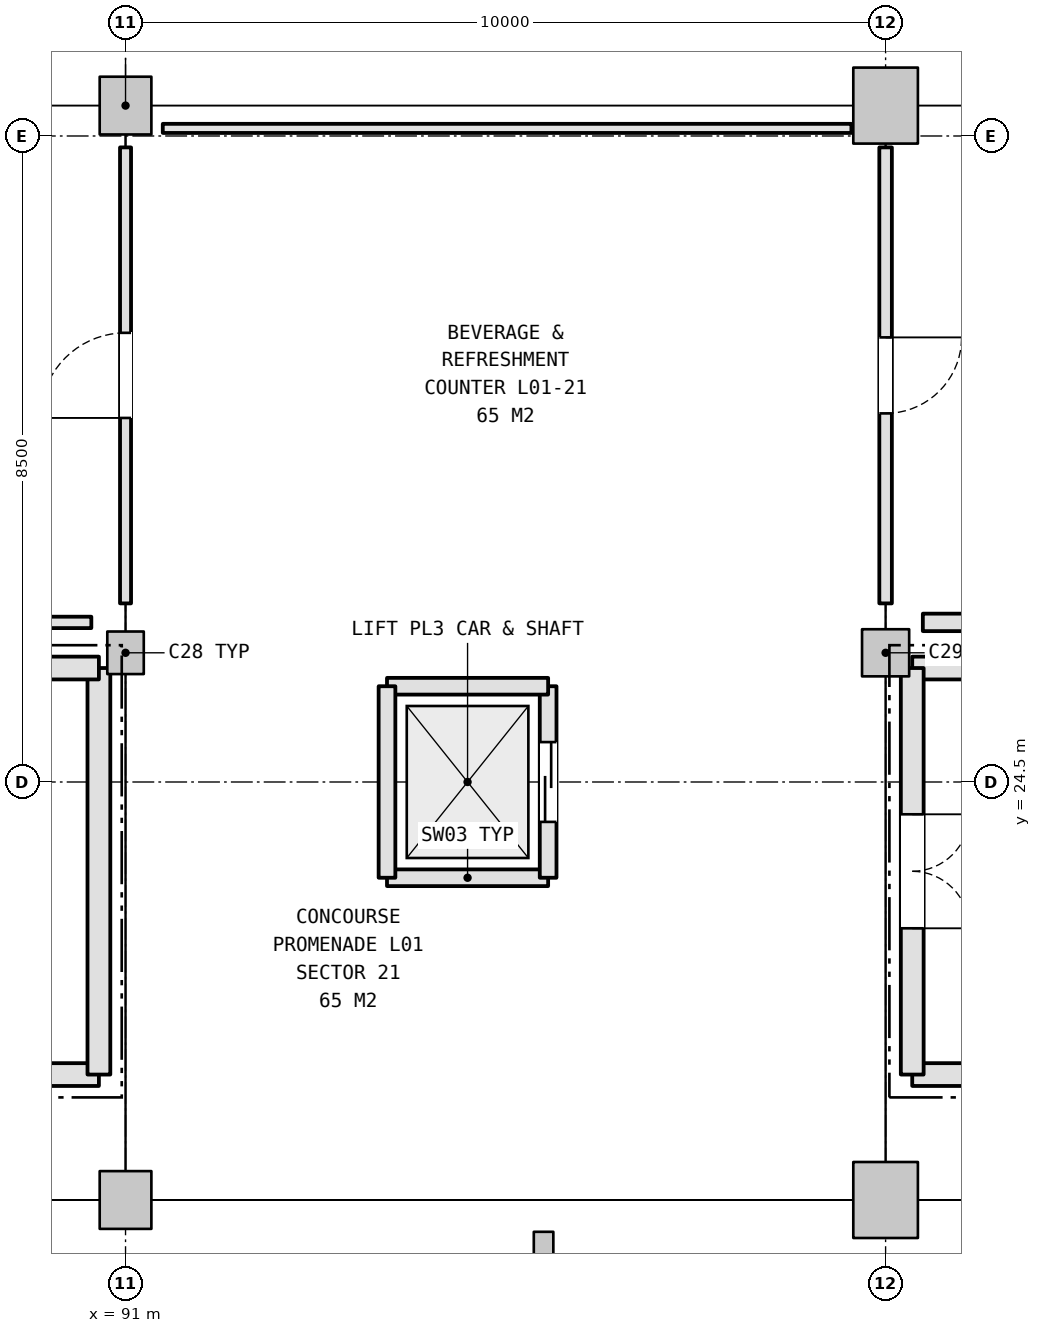
"""IFC4 building model, lengths in metres.
Left out: names, types, materials, properties, quantities, classifications, styles, units other than length and angle.
Written with IfcOpenShell. Run it as: python <this file> out.ifc"""

import sys

from ifc_helpers import new_model, si_unit, direction, frame, frame_2d, origin, origin_2d, place, context, subcontext, project, spatial, rectangle, i_section, extrude, element, fill, save


model = new_model("IFC4")
c1 = context("Model", 3, precision=1e-05, world=origin(), true_north=direction((0.0, 1.0)))
c2 = subcontext(c1, "Body", "Model", "MODEL_VIEW")
j1 = project(units=[si_unit("LENGTHUNIT", "METRE"), si_unit("PLANEANGLEUNIT", "RADIAN")], contexts=[c1])
p1 = place(None, origin())
s1 = spatial("IfcSite", under=j1, at=p1, CompositionType="ELEMENT")
p2 = place(p1, origin())
s2 = spatial("IfcBuilding", under=s1, at=p2, CompositionType="ELEMENT")
p3 = place(p2, frame((0.0, 0.0, 5.4)))
s3 = spatial("IfcBuildingStorey", under=s2, at=p3, CompositionType="ELEMENT", Elevation=5.4)
p4 = place(p3, frame((91.0, 33.4, 0.0), z_axis=(0.0, 0.0, 1.0), x_axis=(1.0, 0.0, 0.0)))
e1 = element("IfcColumn", 1, at=p4, inside=s3, PredefinedType="COLUMN", context=c2, shape_type="SweptSolid", body=[
    extrude(rectangle(XDim=0.68, YDim=0.76, at=origin_2d()), origin(), (0.0, 0.0, 1.0), 5.4),
])
p5 = place(p3, frame((91.0, 26.2, 0.0), z_axis=(0.0, 0.0, 1.0), x_axis=(1.0, 0.0, 0.0)))
e2 = element("IfcColumn", 2, at=p5, inside=s3, PredefinedType="COLUMN", context=c2, shape_type="SweptSolid", body=[
    extrude(rectangle(XDim=0.48, YDim=0.56, at=origin_2d()), origin(), (0.0, 0.0, 1.0), 5.4),
])
p6 = place(p3, frame((91.0, 19.0, 0.0), z_axis=(0.0, 0.0, 1.0), x_axis=(1.0, 0.0, 0.0)))
e3 = element("IfcColumn", 3, at=p6, inside=s3, PredefinedType="COLUMN", context=c2, shape_type="SweptSolid", body=[
    extrude(rectangle(XDim=0.68, YDim=0.76, at=origin_2d()), origin(), (0.0, 0.0, 1.0), 5.4),
])
p7 = place(p3, frame((101.0, 33.4, 0.0), z_axis=(0.0, 0.0, 1.0), x_axis=(1.0, 0.0, 0.0)))
e4 = element("IfcColumn", 4, at=p7, inside=s3, PredefinedType="COLUMN", context=c2, shape_type="SweptSolid", body=[
    extrude(rectangle(XDim=0.85, YDim=1.0, at=origin_2d()), origin(), (0.0, 0.0, 1.0), 5.4),
])
p8 = place(p3, frame((101.0, 26.2, 0.0), z_axis=(0.0, 0.0, 1.0), x_axis=(1.0, 0.0, 0.0)))
e5 = element("IfcColumn", 5, at=p8, inside=s3, PredefinedType="COLUMN", context=c2, shape_type="SweptSolid", body=[
    extrude(rectangle(XDim=0.62, YDim=0.62, at=origin_2d()), origin(), (0.0, 0.0, 1.0), 5.4),
])
p9 = place(p3, frame((101.0, 19.0, 0.0), z_axis=(0.0, 0.0, 1.0), x_axis=(1.0, 0.0, 0.0)))
e6 = element("IfcColumn", 6, at=p9, inside=s3, PredefinedType="COLUMN", context=c2, shape_type="SweptSolid", body=[
    extrude(rectangle(XDim=0.85, YDim=1.0, at=origin_2d()), origin(), (0.0, 0.0, 1.0), 5.4),
])
p10 = place(p3, frame((96.5, 18.4, 0.0), z_axis=(0.0, 0.0, 1.0), x_axis=(1.0, 0.0, 0.0)))
e7 = element("IfcColumn", 7, at=p10, inside=s3, PredefinedType="COLUMN", context=c2, shape_type="SweptSolid", body=[
    extrude(i_section(OverallWidth=0.257, OverallDepth=0.363, WebThickness=0.013, FlangeThickness=0.022, FilletRadius=0.015, at=origin_2d()), origin(), (0.0, 0.0, 1.0), 5.4),
])
p11 = place(p3, frame((81.35, 20.65, 0.0), z_axis=(0.0, 0.0, 1.0), x_axis=(1.0, 0.0, 0.0)))
e8 = element("IfcWall", 8, at=p11, inside=s3, PredefinedType="SHEAR", context=c2, shape_type="SweptSolid", body=[
    extrude(rectangle(XDim=9.299, YDim=0.3, at=frame_2d((4.65, 0.0))), origin(), (0.0, 0.0, 1.0), 5.14),
])
p12 = place(p3, frame((90.65, 20.65, 0.0), z_axis=(0.0, 0.0, 1.0), x_axis=(0.0, 1.0, 0.0)))
e9 = element("IfcWall", 9, at=p12, inside=s3, PredefinedType="SHEAR", context=c2, shape_type="SweptSolid", body=[
    extrude(rectangle(XDim=5.349, YDim=0.3, at=frame_2d((2.675, 0.0))), origin(), (0.0, 0.0, 1.0), 5.14),
])
for number, where, z_axis, x_axis in (
    (10, (90.65, 26.0, 0.0), (0.0, 0.0, 1.0), (-1.0, 0.0, 0.0)),
    (11, (101.35, 20.65, 0.0), (0.0, 0.0, 1.0), (1.0, 0.0, 0.0)),
    (12, (110.65, 26.0, 0.0), (0.0, 0.0, 1.0), (-1.0, 0.0, 0.0)),
):
    element("IfcWall", number, at=place(p3, frame(where, z_axis=z_axis, x_axis=x_axis)), inside=s3, PredefinedType="SHEAR", context=c2, shape_type="SweptSolid", body=[
        extrude(rectangle(XDim=9.299, YDim=0.3, at=frame_2d((4.65, 0.0))), origin(), (0.0, 0.0, 1.0), 5.14),
    ])
p13 = place(p3, frame((101.35, 26.0, 0.0), z_axis=(0.0, 0.0, 1.0), x_axis=(0.0, -1.0, 0.0)))
e13 = element("IfcWall", 13, at=p13, inside=s3, PredefinedType="SHEAR", context=c2, shape_type="SweptSolid", body=[
    extrude(rectangle(XDim=5.349, YDim=0.3, at=frame_2d((2.675, 0.0))), origin(), (0.0, 0.0, 1.0), 5.14),
])
p14 = place(p13, frame((1.925, 0.0, 0.0)))
e14 = element("IfcOpeningElement", 14, at=p14, cuts=e13, PredefinedType="OPENING", context=c2, shape_type="SweptSolid", body=[
    extrude(rectangle(XDim=1.5, YDim=2.2, at=frame_2d((0.75, 1.1))), frame((0.0, 0.16, 0.0), z_axis=(0.0, -1.0, 0.0), x_axis=(1.0, 0.0, 0.0)), (0.0, 0.0, 1.0), 0.32),
])
p15 = place(p3, frame((94.44, 23.24, 0.0), z_axis=(0.0, 0.0, 1.0), x_axis=(1.0, 0.0, 0.0)))
e15 = element("IfcWall", 15, at=p15, inside=s3, PredefinedType="SHEAR", context=c2, shape_type="SweptSolid", body=[
    extrude(rectangle(XDim=2.12, YDim=0.22, at=frame_2d((1.06, 0.0))), origin(), (0.0, 0.0, 1.0), 5.14),
])
p16 = place(p3, frame((96.56, 23.24, 0.0), z_axis=(0.0, 0.0, 1.0), x_axis=(0.0, 1.0, 0.0)))
e16 = element("IfcWall", 16, at=p16, inside=s3, PredefinedType="SHEAR", context=c2, shape_type="SweptSolid", body=[
    extrude(rectangle(XDim=2.52, YDim=0.22, at=frame_2d((1.26, 0.0))), origin(), (0.0, 0.0, 1.0), 5.14),
])
p17 = place(p16, frame((0.735, 0.0, 0.0)))
e17 = element("IfcOpeningElement", 17, at=p17, cuts=e16, PredefinedType="OPENING", context=c2, shape_type="SweptSolid", body=[
    extrude(rectangle(XDim=1.05, YDim=2.15, at=frame_2d((0.525, 1.075))), frame((0.0, 0.12, 0.0), z_axis=(0.0, -1.0, 0.0), x_axis=(1.0, 0.0, 0.0)), (0.0, 0.0, 1.0), 0.24),
])
p18 = place(p3, frame((96.56, 25.76, 0.0), z_axis=(0.0, 0.0, 1.0), x_axis=(-1.0, 0.0, 0.0)))
e18 = element("IfcWall", 18, at=p18, inside=s3, PredefinedType="SHEAR", context=c2, shape_type="SweptSolid", body=[
    extrude(rectangle(XDim=2.12, YDim=0.22, at=frame_2d((1.06, 0.0))), origin(), (0.0, 0.0, 1.0), 5.14),
])
p19 = place(p3, frame((94.44, 25.76, 0.0), z_axis=(0.0, 0.0, 1.0), x_axis=(0.0, -1.0, 0.0)))
e19 = element("IfcWall", 19, at=p19, inside=s3, PredefinedType="SHEAR", context=c2, shape_type="SweptSolid", body=[
    extrude(rectangle(XDim=2.52, YDim=0.22, at=frame_2d((1.26, 0.0))), origin(), (0.0, 0.0, 1.0), 5.14),
])
p20 = place(p3, frame((91.0, 32.85, 0.0), z_axis=(0.0, 0.0, 1.0), x_axis=(0.0, -1.0, 0.0)))
e20 = element("IfcWall", 20, at=p20, inside=s3, PredefinedType="PARTITIONING", context=c2, shape_type="SweptSolid", body=[
    extrude(rectangle(XDim=6.0, YDim=0.145, at=frame_2d((3.0, 0.0))), origin(), (0.0, 0.0, 1.0), 4.305),
])
p21 = place(p20, frame((2.44, 0.0, 0.0)))
e21 = element("IfcOpeningElement", 21, at=p21, cuts=e20, PredefinedType="OPENING", context=c2, shape_type="SweptSolid", body=[
    extrude(rectangle(XDim=1.12, YDim=2.2, at=frame_2d((0.56, 1.1))), frame((0.0, 0.083, 0.0), z_axis=(0.0, -1.0, 0.0), x_axis=(1.0, 0.0, 0.0)), (0.0, 0.0, 1.0), 0.165),
])
p22 = place(p3, frame((90.55, 26.6, 0.0), z_axis=(0.0, 0.0, 1.0), x_axis=(-1.0, 0.0, 0.0)))
e22 = element("IfcWall", 22, at=p22, inside=s3, PredefinedType="PARTITIONING", context=c2, shape_type="SweptSolid", body=[
    extrude(rectangle(XDim=9.06, YDim=0.15, at=frame_2d((4.53, 0.0))), origin(), (0.0, 0.0, 1.0), 5.12),
])
p23 = place(p3, frame((101.0, 32.85, 0.0), z_axis=(0.0, 0.0, 1.0), x_axis=(0.0, -1.0, 0.0)))
e23 = element("IfcWall", 23, at=p23, inside=s3, PredefinedType="PARTITIONING", context=c2, shape_type="SweptSolid", body=[
    extrude(rectangle(XDim=6.0, YDim=0.165, at=frame_2d((3.0, 0.0))), origin(), (0.0, 0.0, 1.0), 4.345),
])
p24 = place(p23, frame((2.5, 0.0, 0.0)))
e24 = element("IfcOpeningElement", 24, at=p24, cuts=e23, PredefinedType="OPENING", context=c2, shape_type="SweptSolid", body=[
    extrude(rectangle(XDim=1.0, YDim=2.15, at=frame_2d((0.5, 1.075))), frame((0.0, 0.093, 0.0), z_axis=(0.0, -1.0, 0.0), x_axis=(1.0, 0.0, 0.0)), (0.0, 0.0, 1.0), 0.185),
])
p25 = place(p3, frame((91.49, 33.1, 0.0), z_axis=(0.0, 0.0, 1.0), x_axis=(1.0, 0.0, 0.0)))
e25 = element("IfcWall", 25, at=p25, inside=s3, PredefinedType="PARTITIONING", context=c2, shape_type="SweptSolid", body=[
    extrude(rectangle(XDim=9.06, YDim=0.12, at=frame_2d((4.53, 0.0))), origin(), (0.0, 0.0, 1.0), 4.405),
])
p26 = place(p3, frame((110.55, 26.6, 0.0), z_axis=(0.0, 0.0, 1.0), x_axis=(-1.0, 0.0, 0.0)))
e26 = element("IfcWall", 26, at=p26, inside=s3, PredefinedType="PLUMBINGWALL", context=c2, shape_type="SweptSolid", body=[
    extrude(rectangle(XDim=9.06, YDim=0.23, at=frame_2d((4.53, 0.0))), origin(), (0.0, 0.0, 1.0), 5.12),
])
p27 = place(p14, origin())
e27 = element("IfcDoor", 27, at=p27, inside=s3, OperationType="DOUBLE_DOOR_SINGLE_SWING", PredefinedType="DOOR", context=c2, shape_type="SweptSolid", body=[
    extrude(rectangle(XDim=1.5, YDim=2.2, at=frame_2d((0.75, 1.1))), frame((0.0, 0.025, 0.0), z_axis=(0.0, -1.0, 0.0), x_axis=(1.0, 0.0, 0.0)), (0.0, 0.0, 1.0), 0.05),
])
fill(e14, e27)
p28 = place(p17, origin())
e28 = element("IfcDoor", 28, at=p28, inside=s3, OperationType="DOUBLE_DOOR_SLIDING", PredefinedType="DOOR", context=c2, shape_type="SweptSolid", body=[
    extrude(rectangle(XDim=1.05, YDim=2.15, at=frame_2d((0.525, 1.075))), frame((0.0, 0.025, 0.0), z_axis=(0.0, -1.0, 0.0), x_axis=(1.0, 0.0, 0.0)), (0.0, 0.0, 1.0), 0.05),
])
fill(e17, e28)
p29 = place(p21, frame((1.12, 0.0, 0.0), z_axis=(0.0, 0.0, 1.0), x_axis=(-1.0, 0.0, 0.0)))
e29 = element("IfcDoor", 29, at=p29, inside=s3, OperationType="SINGLE_SWING_RIGHT", PredefinedType="DOOR", context=c2, shape_type="SweptSolid", body=[
    extrude(rectangle(XDim=1.12, YDim=2.2, at=frame_2d((0.56, 1.1))), frame((0.0, 0.025, 0.0), z_axis=(0.0, -1.0, 0.0), x_axis=(1.0, 0.0, 0.0)), (0.0, 0.0, 1.0), 0.05),
])
fill(e21, e29)
p30 = place(p24, origin())
e30 = element("IfcDoor", 30, at=p30, inside=s3, OperationType="SINGLE_SWING_LEFT", PredefinedType="DOOR", context=c2, shape_type="SweptSolid", body=[
    extrude(rectangle(XDim=1.0, YDim=2.15, at=frame_2d((0.5, 1.075))), frame((0.0, 0.025, 0.0), z_axis=(0.0, -1.0, 0.0), x_axis=(1.0, 0.0, 0.0)), (0.0, 0.0, 1.0), 0.05),
])
fill(e24, e30)
save(model, sys.argv[1])
